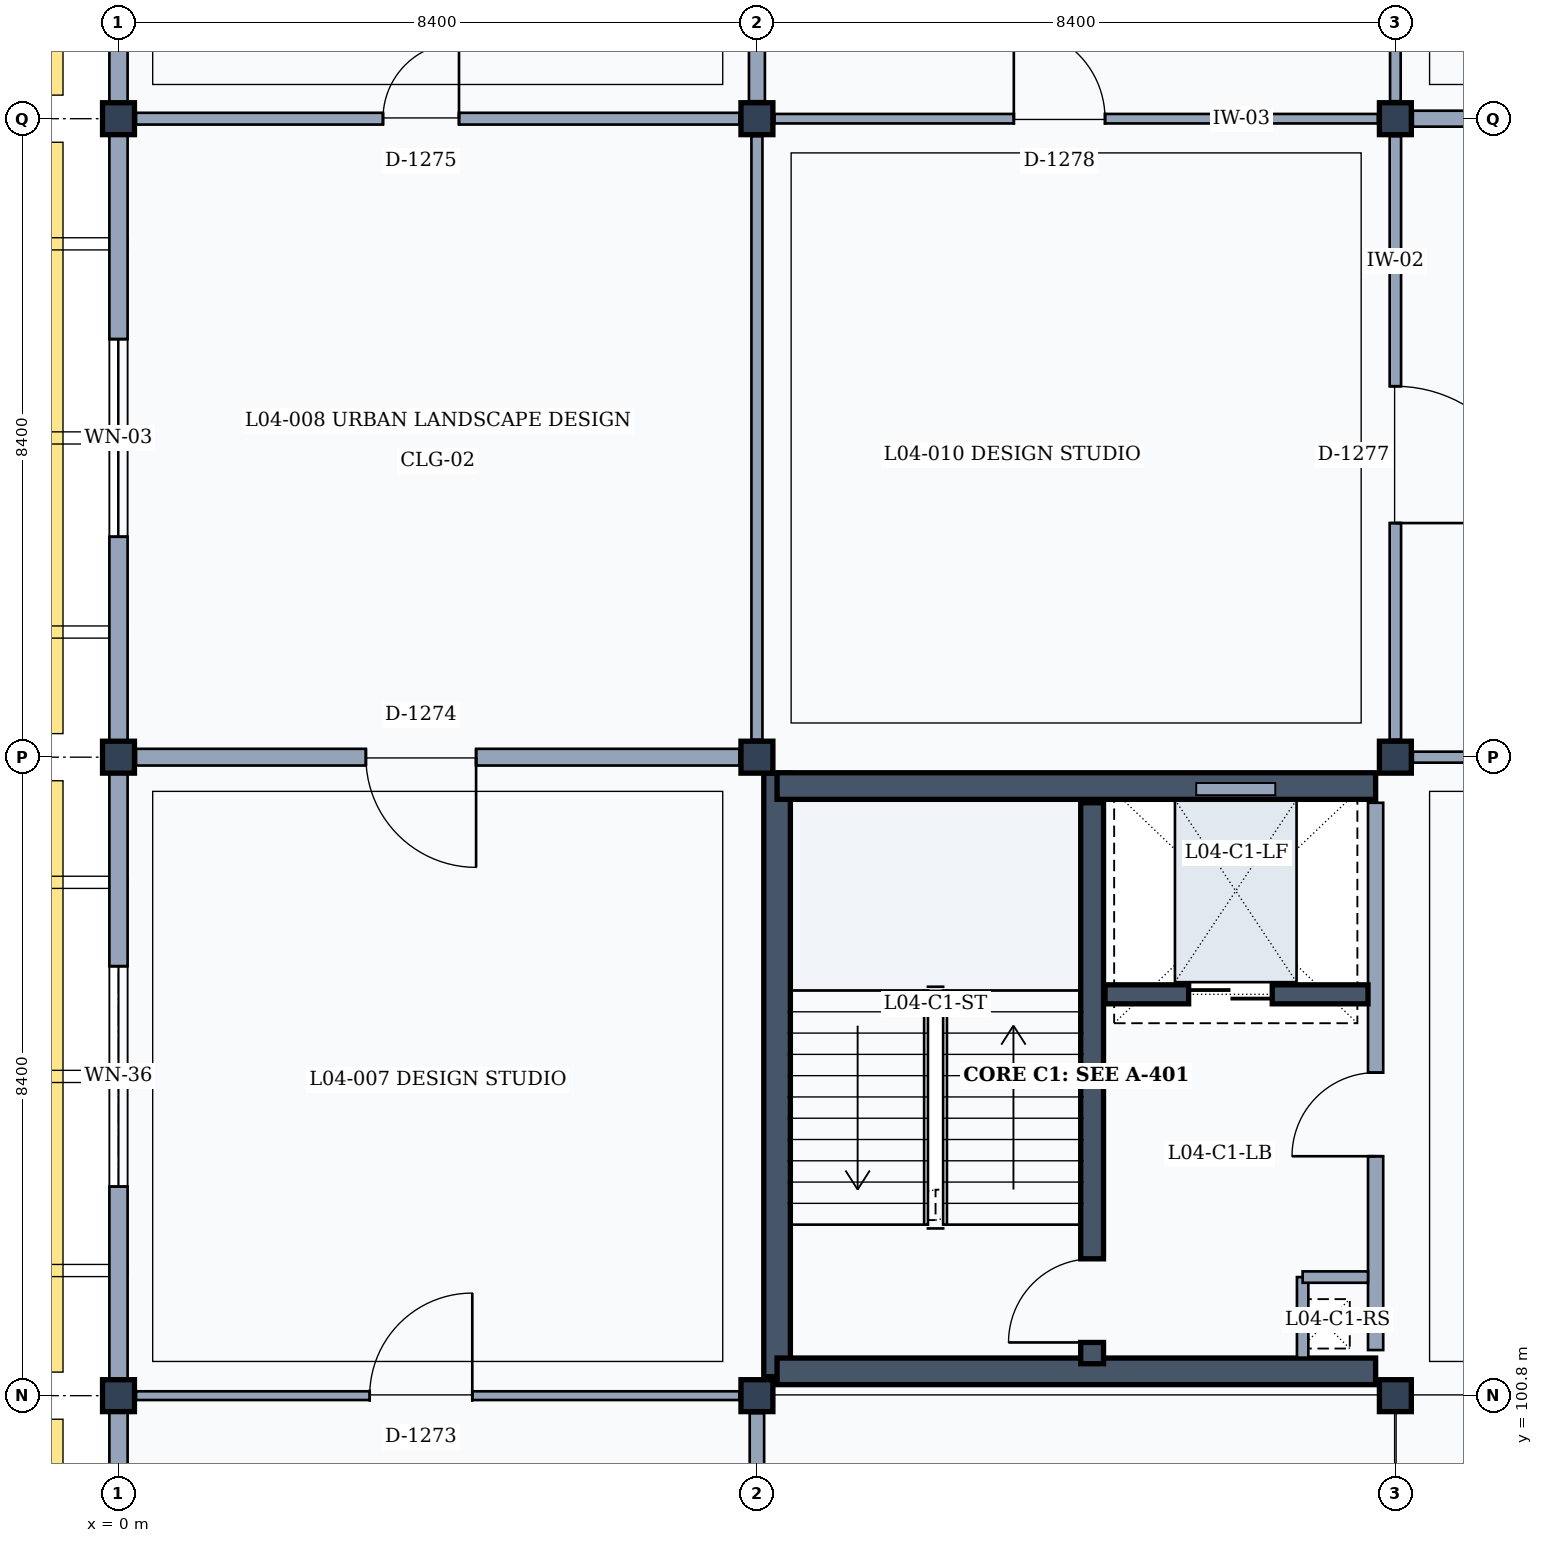
"""IFC4 building model, lengths in metres.
Left out: names, types, materials, properties, quantities, classifications, styles, units other than length and angle.
Written with IfcOpenShell. Run it as: python <this file> out.ifc"""

import sys

from ifc_helpers import new_model, si_unit, direction, frame, frame_2d, origin, origin_2d, place, context, subcontext, project, spatial, rectangle, extrude, element, fill, save


model = new_model("IFC4")
c1 = context("Model", 3, precision=1e-05, world=origin(), true_north=direction((0.0, 1.0)))
c2 = subcontext(c1, "Body", "Model", "MODEL_VIEW")
j1 = project(units=[si_unit("LENGTHUNIT", "METRE"), si_unit("PLANEANGLEUNIT", "RADIAN")], contexts=[c1])
p1 = place(None, origin())
s1 = spatial("IfcSite", under=j1, at=p1, CompositionType="ELEMENT")
p2 = place(p1, origin())
s2 = spatial("IfcBuilding", under=s1, at=p2, CompositionType="ELEMENT")
p3 = place(p2, frame((0.0, 0.0, 18.0)))
s3 = spatial("IfcBuildingStorey", under=s2, at=p3, CompositionType="ELEMENT", Elevation=18.0)
for number, where, z_axis, x_axis in (
    (1, (0.0, 100.8, 0.0), (0.0, 0.0, 1.0), (1.0, 0.0, 0.0)),
    (2, (0.0, 109.2, 0.0), (0.0, 0.0, 1.0), (1.0, 0.0, 0.0)),
    (3, (0.0, 117.6, 0.0), (0.0, 0.0, 1.0), (1.0, 0.0, 0.0)),
    (4, (8.4, 100.8, 0.0), (0.0, 0.0, 1.0), (1.0, 0.0, 0.0)),
    (5, (8.4, 109.2, 0.0), (0.0, 0.0, 1.0), (1.0, 0.0, 0.0)),
    (6, (8.4, 117.6, 0.0), (0.0, 0.0, 1.0), (1.0, 0.0, 0.0)),
    (7, (16.8, 100.8, 0.0), (0.0, 0.0, 1.0), (1.0, 0.0, 0.0)),
    (8, (16.8, 109.2, 0.0), (0.0, 0.0, 1.0), (1.0, 0.0, 0.0)),
    (9, (16.8, 117.6, 0.0), (0.0, 0.0, 1.0), (1.0, 0.0, 0.0)),
):
    element("IfcColumn", number, at=place(p3, frame(where, z_axis=z_axis, x_axis=x_axis)), inside=s3, PredefinedType="COLUMN", context=c2, shape_type="SweptSolid", body=[
        extrude(rectangle(XDim=0.42, YDim=0.42, at=origin_2d()), origin(), (0.0, 0.0, 1.0), 4.2),
    ])
p4 = place(p3, frame((0.0, 92.61, 0.0), z_axis=(0.0, 0.0, 1.0), x_axis=(0.0, 1.0, 0.0)))
e10 = element("IfcWall", 10, at=p4, inside=s3, PredefinedType="SOLIDWALL", context=c2, shape_type="SweptSolid", body=[
    extrude(rectangle(XDim=7.98, YDim=0.24, at=frame_2d((3.99, 0.0))), origin(), (0.0, 0.0, 1.0), 3.36),
])
p5 = place(p4, frame((2.865, 0.0, 0.9)))
e11 = element("IfcOpeningElement", 11, at=p5, cuts=e10, PredefinedType="OPENING", context=c2, shape_type="SweptSolid", body=[
    extrude(rectangle(XDim=2.25, YDim=1.6, at=frame_2d((1.125, 0.8))), frame((0.0, 0.13, 0.0), z_axis=(0.0, -1.0, 0.0), x_axis=(1.0, 0.0, 0.0)), (0.0, 0.0, 1.0), 0.26),
])
p6 = place(p3, frame((0.0, 101.01, 0.0), z_axis=(0.0, 0.0, 1.0), x_axis=(0.0, 1.0, 0.0)))
e12 = element("IfcWall", 12, at=p6, inside=s3, PredefinedType="SOLIDWALL", context=c2, shape_type="SweptSolid", body=[
    extrude(rectangle(XDim=7.98, YDim=0.24, at=frame_2d((3.99, 0.0))), origin(), (0.0, 0.0, 1.0), 3.36),
])
p7 = place(p6, frame((2.54, 0.0, 0.9)))
e13 = element("IfcOpeningElement", 13, at=p7, cuts=e12, PredefinedType="OPENING", context=c2, shape_type="SweptSolid", body=[
    extrude(rectangle(XDim=2.9, YDim=1.75, at=frame_2d((1.45, 0.875))), frame((0.0, 0.13, 0.0), z_axis=(0.0, -1.0, 0.0), x_axis=(1.0, 0.0, 0.0)), (0.0, 0.0, 1.0), 0.26),
])
p8 = place(p3, frame((0.0, 109.41, 0.0), z_axis=(0.0, 0.0, 1.0), x_axis=(0.0, 1.0, 0.0)))
e14 = element("IfcWall", 14, at=p8, inside=s3, PredefinedType="SOLIDWALL", context=c2, shape_type="SweptSolid", body=[
    extrude(rectangle(XDim=7.98, YDim=0.24, at=frame_2d((3.99, 0.0))), origin(), (0.0, 0.0, 1.0), 3.36),
])
p9 = place(p8, frame((2.69, 0.0, 0.9)))
e15 = element("IfcOpeningElement", 15, at=p9, cuts=e14, PredefinedType="OPENING", context=c2, shape_type="SweptSolid", body=[
    extrude(rectangle(XDim=2.6, YDim=2.1, at=frame_2d((1.3, 1.05))), frame((0.0, 0.13, 0.0), z_axis=(0.0, -1.0, 0.0), x_axis=(1.0, 0.0, 0.0)), (0.0, 0.0, 1.0), 0.26),
])
p10 = place(p3, frame((0.0, 117.81, 0.0), z_axis=(0.0, 0.0, 1.0), x_axis=(0.0, 1.0, 0.0)))
e16 = element("IfcWall", 16, at=p10, inside=s3, PredefinedType="SOLIDWALL", context=c2, shape_type="SweptSolid", body=[
    extrude(rectangle(XDim=7.98, YDim=0.24, at=frame_2d((3.99, 0.0))), origin(), (0.0, 0.0, 1.0), 3.36),
])
p11 = place(p10, frame((3.49, 0.0, 0.9)))
e17 = element("IfcOpeningElement", 17, at=p11, cuts=e16, PredefinedType="OPENING", context=c2, shape_type="SweptSolid", body=[
    extrude(rectangle(XDim=1.0, YDim=1.4, at=frame_2d((0.5, 0.7))), frame((0.0, 0.13, 0.0), z_axis=(0.0, -1.0, 0.0), x_axis=(1.0, 0.0, 0.0)), (0.0, 0.0, 1.0), 0.26),
])
p12 = place(p3, frame((8.665, 101.05, 0.0), z_axis=(0.0, 0.0, 1.0), x_axis=(0.0, 1.0, 0.0)))
e18 = element("IfcWall", 18, at=p12, inside=s3, PredefinedType="SHEAR", context=c2, shape_type="SweptSolid", body=[
    extrude(rectangle(XDim=7.94, YDim=0.35, at=frame_2d((3.97, 0.0))), origin(), (0.0, 0.0, 1.0), 3.98),
])
p13 = place(p3, frame((8.665, 108.82, 0.0), z_axis=(0.0, 0.0, 1.0), x_axis=(1.0, 0.0, 0.0)))
e19 = element("IfcWall", 19, at=p13, inside=s3, PredefinedType="SHEAR", context=c2, shape_type="SweptSolid", body=[
    extrude(rectangle(XDim=7.875, YDim=0.35, at=frame_2d((3.938, 0.0))), origin(), (0.0, 0.0, 1.0), 3.98),
])
p14 = place(p3, frame((16.54, 108.6, 0.0), z_axis=(0.0, 0.0, 1.0), x_axis=(0.0, -1.0, 0.0)))
e20 = element("IfcWall", 20, at=p14, inside=s3, PredefinedType="PARTITIONING", context=c2, shape_type="SweptSolid", body=[
    extrude(rectangle(XDim=7.2, YDim=0.2, at=frame_2d((3.6, 0.0))), origin(), (0.0, 0.0, 1.0), 3.32),
])
p15 = place(p14, frame((3.55, 0.0, 0.0)))
e21 = element("IfcOpeningElement", 21, at=p15, cuts=e20, PredefinedType="OPENING", context=c2, shape_type="SweptSolid", body=[
    extrude(rectangle(XDim=1.1, YDim=2.15, at=frame_2d((0.55, 1.075))), frame((0.0, 0.11, 0.0), z_axis=(0.0, -1.0, 0.0), x_axis=(1.0, 0.0, 0.0)), (0.0, 0.0, 1.0), 0.22),
])
p16 = place(p3, frame((16.54, 101.12, 0.0), z_axis=(0.0, 0.0, 1.0), x_axis=(-1.0, 0.0, 0.0)))
e22 = element("IfcWall", 22, at=p16, inside=s3, PredefinedType="SHEAR", context=c2, shape_type="SweptSolid", body=[
    extrude(rectangle(XDim=7.875, YDim=0.35, at=frame_2d((3.938, 0.0))), origin(), (0.0, 0.0, 1.0), 3.98),
])
p17 = place(p3, frame((12.81, 101.22, 0.0), z_axis=(0.0, 0.0, 1.0), x_axis=(0.0, 1.0, 0.0)))
e23 = element("IfcWall", 23, at=p17, inside=s3, PredefinedType="SHEAR", context=c2, shape_type="SweptSolid", body=[
    extrude(rectangle(XDim=7.38, YDim=0.3, at=frame_2d((3.69, 0.0))), origin(), (0.0, 0.0, 1.0), 3.98),
])
p18 = place(p17, frame((0.28, 0.0, 0.0)))
e24 = element("IfcOpeningElement", 24, at=p18, cuts=e23, PredefinedType="OPENING", context=c2, shape_type="SweptSolid", body=[
    extrude(rectangle(XDim=1.1, YDim=2.15, at=frame_2d((0.55, 1.075))), frame((0.0, 0.16, 0.0), z_axis=(0.0, -1.0, 0.0), x_axis=(1.0, 0.0, 0.0)), (0.0, 0.0, 1.0), 0.32),
])
p19 = place(p3, frame((15.58, 102.36, 0.0), z_axis=(0.0, 0.0, 1.0), x_axis=(0.0, -1.0, 0.0)))
e25 = element("IfcWall", 25, at=p19, inside=s3, PredefinedType="PARTITIONING", context=c2, shape_type="SweptSolid", body=[
    extrude(rectangle(XDim=1.06, YDim=0.15, at=frame_2d((0.53, 0.0))), origin(), (0.0, 0.0, 1.0), 3.32),
])
p20 = place(p3, frame((15.58, 102.36, 0.0), z_axis=(0.0, 0.0, 1.0), x_axis=(1.0, 0.0, 0.0)))
e26 = element("IfcWall", 26, at=p20, inside=s3, PredefinedType="PARTITIONING", context=c2, shape_type="SweptSolid", body=[
    extrude(rectangle(XDim=0.86, YDim=0.15, at=frame_2d((0.43, 0.0))), origin(), (0.0, 0.0, 1.0), 3.32),
])
p21 = place(p3, frame((12.98, 106.08, 0.0), z_axis=(0.0, 0.0, 1.0), x_axis=(1.0, 0.0, 0.0)))
e27 = element("IfcWall", 27, at=p21, inside=s3, PredefinedType="SHEAR", context=c2, shape_type="SweptSolid", body=[
    extrude(rectangle(XDim=3.46, YDim=0.25, at=frame_2d((1.73, 0.0))), origin(), (0.0, 0.0, 1.0), 3.98),
])
p22 = place(p21, frame((1.1, 0.0, 0.0)))
e28 = element("IfcOpeningElement", 28, at=p22, cuts=e27, PredefinedType="OPENING", context=c2, shape_type="SweptSolid", body=[
    extrude(rectangle(XDim=1.1, YDim=2.15, at=frame_2d((0.55, 1.075))), frame((0.0, 0.135, 0.0), z_axis=(0.0, -1.0, 0.0), x_axis=(1.0, 0.0, 0.0)), (0.0, 0.0, 1.0), 0.27),
])
p23 = place(p3, frame((8.4, 92.63, 0.0), z_axis=(0.0, 0.0, 1.0), x_axis=(0.0, 1.0, 0.0)))
e29 = element("IfcWall", 29, at=p23, inside=s3, PredefinedType="PARTITIONING", context=c2, shape_type="SweptSolid", body=[
    extrude(rectangle(XDim=7.94, YDim=0.19, at=frame_2d((3.97, 0.0))), origin(), (0.0, 0.0, 1.0), 3.32),
])
p24 = place(p23, frame((3.125, 0.0, 0.0)))
e30 = element("IfcOpeningElement", 30, at=p24, cuts=e29, PredefinedType="OPENING", context=c2, shape_type="SweptSolid", body=[
    extrude(rectangle(XDim=1.25, YDim=2.3, at=frame_2d((0.625, 1.15))), frame((0.0, 0.105, 0.0), z_axis=(0.0, -1.0, 0.0), x_axis=(1.0, 0.0, 0.0)), (0.0, 0.0, 1.0), 0.21),
])
p25 = place(p3, frame((0.23, 100.8, 0.0), z_axis=(0.0, 0.0, 1.0), x_axis=(1.0, 0.0, 0.0)))
e31 = element("IfcWall", 31, at=p25, inside=s3, PredefinedType="PARTITIONING", context=c2, shape_type="SweptSolid", body=[
    extrude(rectangle(XDim=7.94, YDim=0.115, at=frame_2d((3.97, 0.0))), origin(), (0.0, 0.0, 1.0), 3.32),
])
p26 = place(p25, frame((3.075, 0.0, 0.0)))
e32 = element("IfcOpeningElement", 32, at=p26, cuts=e31, PredefinedType="OPENING", context=c2, shape_type="SweptSolid", body=[
    extrude(rectangle(XDim=1.35, YDim=2.25, at=frame_2d((0.675, 1.125))), frame((0.0, 0.067, 0.0), z_axis=(0.0, -1.0, 0.0), x_axis=(1.0, 0.0, 0.0)), (0.0, 0.0, 1.0), 0.135),
])
p27 = place(p3, frame((0.23, 109.2, 0.0), z_axis=(0.0, 0.0, 1.0), x_axis=(1.0, 0.0, 0.0)))
e33 = element("IfcWall", 33, at=p27, inside=s3, PredefinedType="PARTITIONING", context=c2, shape_type="SweptSolid", body=[
    extrude(rectangle(XDim=7.94, YDim=0.22, at=frame_2d((3.97, 0.0))), origin(), (0.0, 0.0, 1.0), 3.32),
])
p28 = place(p27, frame((3.025, 0.0, 0.0)))
e34 = element("IfcOpeningElement", 34, at=p28, cuts=e33, PredefinedType="OPENING", context=c2, shape_type="SweptSolid", body=[
    extrude(rectangle(XDim=1.45, YDim=2.35, at=frame_2d((0.725, 1.175))), frame((0.0, 0.12, 0.0), z_axis=(0.0, -1.0, 0.0), x_axis=(1.0, 0.0, 0.0)), (0.0, 0.0, 1.0), 0.24),
])
p29 = place(p3, frame((8.4, 109.43, 0.0), z_axis=(0.0, 0.0, 1.0), x_axis=(0.0, 1.0, 0.0)))
e35 = element("IfcWall", 35, at=p29, inside=s3, PredefinedType="PARTITIONING", context=c2, shape_type="SweptSolid", body=[
    extrude(rectangle(XDim=7.94, YDim=0.145, at=frame_2d((3.97, 0.0))), origin(), (0.0, 0.0, 1.0), 3.32),
])
p30 = place(p3, frame((0.23, 117.6, 0.0), z_axis=(0.0, 0.0, 1.0), x_axis=(1.0, 0.0, 0.0)))
e36 = element("IfcWall", 36, at=p30, inside=s3, PredefinedType="PARTITIONING", context=c2, shape_type="SweptSolid", body=[
    extrude(rectangle(XDim=7.94, YDim=0.155, at=frame_2d((3.97, 0.0))), origin(), (0.0, 0.0, 1.0), 3.32),
])
p31 = place(p30, frame((3.25, 0.0, 0.0)))
e37 = element("IfcOpeningElement", 37, at=p31, cuts=e36, PredefinedType="OPENING", context=c2, shape_type="SweptSolid", body=[
    extrude(rectangle(XDim=1.0, YDim=2.15, at=frame_2d((0.5, 1.075))), frame((0.0, 0.087, 0.0), z_axis=(0.0, -1.0, 0.0), x_axis=(1.0, 0.0, 0.0)), (0.0, 0.0, 1.0), 0.175),
])
p32 = place(p3, frame((8.4, 117.83, 0.0), z_axis=(0.0, 0.0, 1.0), x_axis=(0.0, 1.0, 0.0)))
e38 = element("IfcWall", 38, at=p32, inside=s3, PredefinedType="PARTITIONING", context=c2, shape_type="SweptSolid", body=[
    extrude(rectangle(XDim=7.94, YDim=0.21, at=frame_2d((3.97, 0.0))), origin(), (0.0, 0.0, 1.0), 3.32),
])
p33 = place(p3, frame((16.8, 109.43, 0.0), z_axis=(0.0, 0.0, 1.0), x_axis=(0.0, 1.0, 0.0)))
e39 = element("IfcWall", 39, at=p33, inside=s3, PredefinedType="PARTITIONING", context=c2, shape_type="SweptSolid", body=[
    extrude(rectangle(XDim=7.94, YDim=0.15, at=frame_2d((3.97, 0.0))), origin(), (0.0, 0.0, 1.0), 3.32),
])
p34 = place(p33, frame((2.85, 0.0, 0.0)))
e40 = element("IfcOpeningElement", 40, at=p34, cuts=e39, PredefinedType="OPENING", context=c2, shape_type="SweptSolid", body=[
    extrude(rectangle(XDim=1.8, YDim=2.3, at=frame_2d((0.9, 1.15))), frame((0.0, 0.085, 0.0), z_axis=(0.0, -1.0, 0.0), x_axis=(1.0, 0.0, 0.0)), (0.0, 0.0, 1.0), 0.17),
])
p35 = place(p3, frame((8.63, 117.6, 0.0), z_axis=(0.0, 0.0, 1.0), x_axis=(1.0, 0.0, 0.0)))
e41 = element("IfcWall", 41, at=p35, inside=s3, PredefinedType="PARTITIONING", context=c2, shape_type="SweptSolid", body=[
    extrude(rectangle(XDim=7.94, YDim=0.125, at=frame_2d((3.97, 0.0))), origin(), (0.0, 0.0, 1.0), 3.32),
])
p36 = place(p35, frame((3.15, 0.0, 0.0)))
e42 = element("IfcOpeningElement", 42, at=p36, cuts=e41, PredefinedType="OPENING", context=c2, shape_type="SweptSolid", body=[
    extrude(rectangle(XDim=1.2, YDim=2.2, at=frame_2d((0.6, 1.1))), frame((0.0, 0.073, 0.0), z_axis=(0.0, -1.0, 0.0), x_axis=(1.0, 0.0, 0.0)), (0.0, 0.0, 1.0), 0.145),
])
p37 = place(p3, frame((16.8, 117.83, 0.0), z_axis=(0.0, 0.0, 1.0), x_axis=(0.0, 1.0, 0.0)))
e43 = element("IfcWall", 43, at=p37, inside=s3, PredefinedType="PARTITIONING", context=c2, shape_type="SweptSolid", body=[
    extrude(rectangle(XDim=7.94, YDim=0.14, at=frame_2d((3.97, 0.0))), origin(), (0.0, 0.0, 1.0), 3.32),
])
p38 = place(p3, frame((17.03, 109.2, 0.0), z_axis=(0.0, 0.0, 1.0), x_axis=(1.0, 0.0, 0.0)))
e44 = element("IfcWall", 44, at=p38, inside=s3, PredefinedType="PARTITIONING", context=c2, shape_type="SweptSolid", body=[
    extrude(rectangle(XDim=7.94, YDim=0.145, at=frame_2d((3.97, 0.0))), origin(), (0.0, 0.0, 1.0), 3.32),
])
p39 = place(p38, frame((2.975, 0.0, 0.0)))
e45 = element("IfcOpeningElement", 45, at=p39, cuts=e44, PredefinedType="OPENING", context=c2, shape_type="SweptSolid", body=[
    extrude(rectangle(XDim=1.55, YDim=2.35, at=frame_2d((0.775, 1.175))), frame((0.0, 0.083, 0.0), z_axis=(0.0, -1.0, 0.0), x_axis=(1.0, 0.0, 0.0)), (0.0, 0.0, 1.0), 0.165),
])
p40 = place(p3, frame((17.03, 117.6, 0.0), z_axis=(0.0, 0.0, 1.0), x_axis=(1.0, 0.0, 0.0)))
e46 = element("IfcWall", 46, at=p40, inside=s3, PredefinedType="PARTITIONING", context=c2, shape_type="SweptSolid", body=[
    extrude(rectangle(XDim=7.94, YDim=0.21, at=frame_2d((3.97, 0.0))), origin(), (0.0, 0.0, 1.0), 3.32),
])
p41 = place(p40, frame((2.9, 0.0, 0.0)))
e47 = element("IfcOpeningElement", 47, at=p41, cuts=e46, PredefinedType="OPENING", context=c2, shape_type="SweptSolid", body=[
    extrude(rectangle(XDim=1.7, YDim=2.3, at=frame_2d((0.85, 1.15))), frame((0.0, 0.115, 0.0), z_axis=(0.0, -1.0, 0.0), x_axis=(1.0, 0.0, 0.0)), (0.0, 0.0, 1.0), 0.23),
])
p42 = place(p7, origin())
e48 = element("IfcWindow", 48, at=p42, inside=s3, PartitioningType="SINGLE_PANEL", PredefinedType="WINDOW", context=c2, shape_type="SweptSolid", body=[
    extrude(rectangle(XDim=2.9, YDim=1.75, at=frame_2d((1.45, 0.875))), frame((0.0, 0.03, 0.0), z_axis=(0.0, -1.0, 0.0), x_axis=(1.0, 0.0, 0.0)), (0.0, 0.0, 1.0), 0.06),
])
fill(e13, e48)
p43 = place(p9, origin())
e49 = element("IfcWindow", 49, at=p43, inside=s3, PartitioningType="SINGLE_PANEL", PredefinedType="WINDOW", context=c2, shape_type="SweptSolid", body=[
    extrude(rectangle(XDim=2.6, YDim=2.1, at=frame_2d((1.3, 1.05))), frame((0.0, 0.03, 0.0), z_axis=(0.0, -1.0, 0.0), x_axis=(1.0, 0.0, 0.0)), (0.0, 0.0, 1.0), 0.06),
])
fill(e15, e49)
p44 = place(p15, frame((1.1, 0.0, 0.0), z_axis=(0.0, 0.0, 1.0), x_axis=(-1.0, 0.0, 0.0)))
e50 = element("IfcDoor", 50, at=p44, inside=s3, OperationType="SINGLE_SWING_LEFT", PredefinedType="DOOR", context=c2, shape_type="SweptSolid", body=[
    extrude(rectangle(XDim=1.1, YDim=2.15, at=frame_2d((0.55, 1.075))), frame((0.0, 0.025, 0.0), z_axis=(0.0, -1.0, 0.0), x_axis=(1.0, 0.0, 0.0)), (0.0, 0.0, 1.0), 0.05),
])
fill(e21, e50)
p45 = place(p18, origin())
e51 = element("IfcDoor", 51, at=p45, inside=s3, OperationType="SINGLE_SWING_LEFT", PredefinedType="DOOR", context=c2, shape_type="SweptSolid", body=[
    extrude(rectangle(XDim=1.1, YDim=2.15, at=frame_2d((0.55, 1.075))), frame((0.0, 0.025, 0.0), z_axis=(0.0, -1.0, 0.0), x_axis=(1.0, 0.0, 0.0)), (0.0, 0.0, 1.0), 0.05),
])
fill(e24, e51)
p46 = place(p22, origin())
e52 = element("IfcDoor", 52, at=p46, inside=s3, OperationType="DOUBLE_DOOR_SLIDING", PredefinedType="DOOR", context=c2, shape_type="SweptSolid", body=[
    extrude(rectangle(XDim=1.1, YDim=2.15, at=frame_2d((0.55, 1.075))), frame((0.0, 0.025, 0.0), z_axis=(0.0, -1.0, 0.0), x_axis=(1.0, 0.0, 0.0)), (0.0, 0.0, 1.0), 0.05),
])
fill(e28, e52)
p47 = place(p26, origin())
e53 = element("IfcDoor", 53, at=p47, inside=s3, OperationType="SINGLE_SWING_RIGHT", PredefinedType="DOOR", context=c2, shape_type="SweptSolid", body=[
    extrude(rectangle(XDim=1.35, YDim=2.25, at=frame_2d((0.675, 1.125))), frame((0.0, 0.025, 0.0), z_axis=(0.0, -1.0, 0.0), x_axis=(1.0, 0.0, 0.0)), (0.0, 0.0, 1.0), 0.05),
])
fill(e32, e53)
p48 = place(p28, frame((1.45, 0.0, 0.0), z_axis=(0.0, 0.0, 1.0), x_axis=(-1.0, 0.0, 0.0)))
e54 = element("IfcDoor", 54, at=p48, inside=s3, OperationType="SINGLE_SWING_LEFT", PredefinedType="DOOR", context=c2, shape_type="SweptSolid", body=[
    extrude(rectangle(XDim=1.45, YDim=2.35, at=frame_2d((0.725, 1.175))), frame((0.0, 0.025, 0.0), z_axis=(0.0, -1.0, 0.0), x_axis=(1.0, 0.0, 0.0)), (0.0, 0.0, 1.0), 0.05),
])
fill(e34, e54)
p49 = place(p31, origin())
e55 = element("IfcDoor", 55, at=p49, inside=s3, OperationType="SINGLE_SWING_RIGHT", PredefinedType="DOOR", context=c2, shape_type="SweptSolid", body=[
    extrude(rectangle(XDim=1.0, YDim=2.15, at=frame_2d((0.5, 1.075))), frame((0.0, 0.025, 0.0), z_axis=(0.0, -1.0, 0.0), x_axis=(1.0, 0.0, 0.0)), (0.0, 0.0, 1.0), 0.05),
])
fill(e37, e55)
p50 = place(p34, frame((1.8, 0.0, 0.0), z_axis=(0.0, 0.0, 1.0), x_axis=(-1.0, 0.0, 0.0)))
e56 = element("IfcDoor", 56, at=p50, inside=s3, OperationType="SINGLE_SWING_RIGHT", PredefinedType="DOOR", context=c2, shape_type="SweptSolid", body=[
    extrude(rectangle(XDim=1.8, YDim=2.3, at=frame_2d((0.9, 1.15))), frame((0.0, 0.025, 0.0), z_axis=(0.0, -1.0, 0.0), x_axis=(1.0, 0.0, 0.0)), (0.0, 0.0, 1.0), 0.05),
])
fill(e40, e56)
p51 = place(p36, origin())
e57 = element("IfcDoor", 57, at=p51, inside=s3, OperationType="SINGLE_SWING_LEFT", PredefinedType="DOOR", context=c2, shape_type="SweptSolid", body=[
    extrude(rectangle(XDim=1.2, YDim=2.2, at=frame_2d((0.6, 1.1))), frame((0.0, 0.025, 0.0), z_axis=(0.0, -1.0, 0.0), x_axis=(1.0, 0.0, 0.0)), (0.0, 0.0, 1.0), 0.05),
])
fill(e42, e57)
save(model, sys.argv[1])
